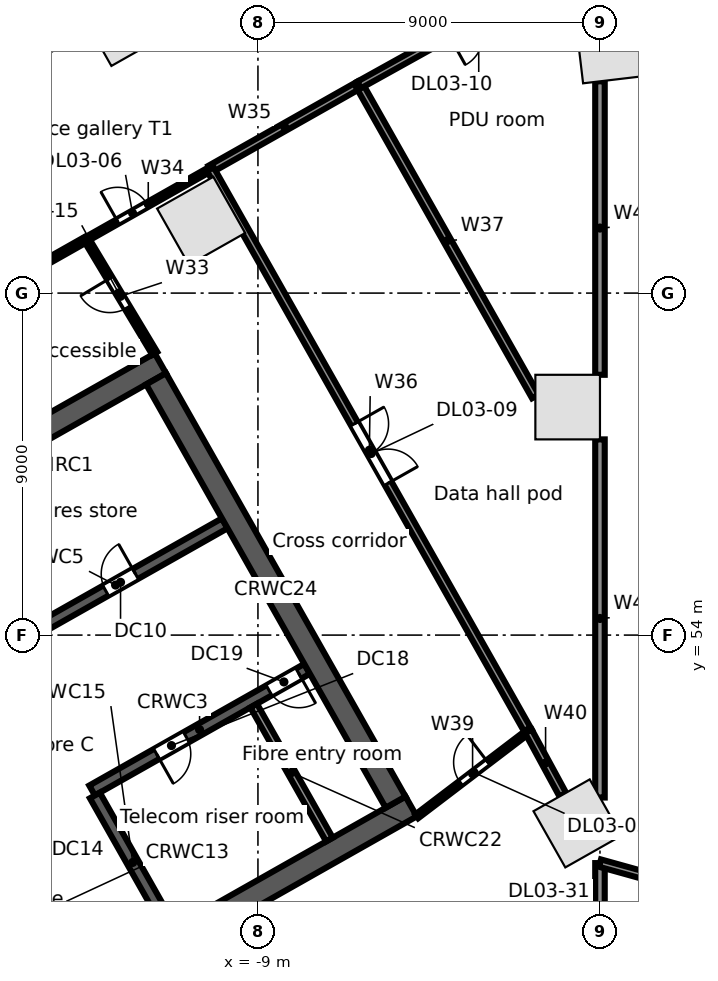
"""IFC4 building model, lengths in metres.
Left out: names, types, materials, properties, quantities, classifications, styles, units other than length and angle.
Written with IfcOpenShell. Run it as: python <this file> out.ifc"""

import sys

from ifc_helpers import new_model, si_unit, direction, frame, frame_2d, origin, origin_2d, place, context, subcontext, project, spatial, rectangle, extrude, element, fill, save


model = new_model("IFC4")
c1 = context("Model", 3, precision=1e-05, world=origin(), true_north=direction((0.0, 1.0)))
c2 = subcontext(c1, "Body", "Model", "MODEL_VIEW")
j1 = project(units=[si_unit("LENGTHUNIT", "METRE"), si_unit("PLANEANGLEUNIT", "RADIAN")], contexts=[c1])
p1 = place(None, origin())
s1 = spatial("IfcSite", under=j1, at=p1, CompositionType="ELEMENT")
p2 = place(p1, origin())
s2 = spatial("IfcBuilding", under=s1, at=p2, CompositionType="ELEMENT")
p3 = place(p2, frame((0.0, 0.0, 16.5)))
s3 = spatial("IfcBuildingStorey", under=s2, at=p3, CompositionType="ELEMENT", Elevation=16.5)
for number, where, z_axis, x_axis in (
    (1, (0.3, 69.464, 0.0), (0.0, 0.0, 1.0), (-0.993, -0.118, 0.0)),
    (2, (-10.495, 64.902, 0.0), (0.0, 0.0, 1.0), (-0.87, -0.492, 0.0)),
    (3, (-0.591, 49.044, 0.0), (0.0, 0.0, 1.0), (0.87, 0.492, 0.0)),
    (4, (-0.85, 60.0, 0.0), (0.0, 0.0, 1.0), (0.0, 1.0, 0.0)),
):
    element("IfcColumn", number, at=place(p3, frame(where, z_axis=z_axis, x_axis=x_axis)), inside=s3, PredefinedType="COLUMN", context=c2, shape_type="SweptSolid", body=[
        extrude(rectangle(XDim=1.7, YDim=1.7, at=origin_2d()), origin(), (0.0, 0.0, 1.0), 5.0),
    ])
p4 = place(p3, frame((-12.667, 69.659, 0.0), z_axis=(0.0, 0.0, 1.0), x_axis=(-0.87035569594, -0.492423560103, 0.0)))
e5 = element("IfcColumn", 5, at=p4, inside=s3, PredefinedType="COLUMN", context=c2, shape_type="SweptSolid", body=[
    extrude(rectangle(XDim=1.0, YDim=1.0, at=origin_2d()), origin(), (0.0, 0.0, 1.0), 5.0),
])
p5 = place(p3, frame((-63.707, 41.701, 0.0), z_axis=(0.0, 0.0, 1.0), x_axis=(0.870355510268, 0.492423888277, 0.0)))
e6 = element("IfcWall", 6, at=p5, inside=s3, PredefinedType="STANDARD", context=c2, shape_type="SweptSolid", body=[
    extrude(rectangle(XDim=67.903, YDim=0.3, at=frame_2d((33.952, 0.0))), origin(), (0.0, 0.0, 1.0), 4.65),
])
p6 = place(p3, frame((-18.024, 42.104, 0.0), z_axis=(0.0, 0.0, 1.0), x_axis=(0.870360574057, 0.492414937962, 0.0)))
e7 = element("IfcWall", 7, at=p6, inside=s3, PredefinedType="SOLIDWALL", context=c2, shape_type="SweptSolid", body=[
    extrude(rectangle(XDim=15.0, YDim=0.6, at=frame_2d((7.5, 0.0))), origin(), (0.0, 0.0, 1.0), 4.65),
])
p7 = place(p6, frame((6.1, 0.0, 0.0)))
e8 = element("IfcOpeningElement", 8, at=p7, cuts=e7, PredefinedType="OPENING", context=c2, shape_type="SweptSolid", body=[
    extrude(rectangle(XDim=1.2, YDim=2.1, at=frame_2d((0.6, 1.05))), frame((0.0, 0.31, 0.0), z_axis=(0.0, -1.0, 0.0), x_axis=(1.0, 0.0, 0.0)), (0.0, 0.0, 1.0), 0.62),
])
p8 = place(p3, frame((-13.365, 49.911, 0.0), z_axis=(0.0, 0.0, 1.0), x_axis=(0.870340995471, 0.49244954219, 0.0)))
e9 = element("IfcWall", 9, at=p8, inside=s3, PredefinedType="SOLIDWALL", context=c2, shape_type="SweptSolid", body=[
    extrude(rectangle(XDim=6.5, YDim=0.3, at=frame_2d((3.25, 0.0))), origin(), (0.0, 0.0, 1.0), 4.65),
])
p9 = place(p8, frame((1.95, 0.0, 0.0)))
e10 = element("IfcOpeningElement", 10, at=p9, cuts=e9, PredefinedType="OPENING", context=c2, shape_type="SweptSolid", body=[
    extrude(rectangle(XDim=0.9, YDim=2.1, at=frame_2d((0.45, 1.05))), frame((0.0, 0.16, 0.0), z_axis=(0.0, -1.0, 0.0), x_axis=(1.0, 0.0, 0.0)), (0.0, 0.0, 1.0), 0.32),
])
p10 = place(p8, frame((5.35, 0.0, 0.0)))
e11 = element("IfcOpeningElement", 11, at=p10, cuts=e9, PredefinedType="OPENING", context=c2, shape_type="SweptSolid", body=[
    extrude(rectangle(XDim=0.9, YDim=2.1, at=frame_2d((0.45, 1.05))), frame((0.0, 0.16, 0.0), z_axis=(0.0, -1.0, 0.0), x_axis=(1.0, 0.0, 0.0)), (0.0, 0.0, 1.0), 0.32),
])
p11 = place(p3, frame((-15.618, 53.691, 0.0), z_axis=(0.0, 0.0, 1.0), x_axis=(0.870356769198, 0.492421663121, 0.0)))
e12 = element("IfcWall", 12, at=p11, inside=s3, PredefinedType="SOLIDWALL", context=c2, shape_type="SweptSolid", body=[
    extrude(rectangle(XDim=6.6, YDim=0.3, at=frame_2d((3.3, 0.0))), origin(), (0.0, 0.0, 1.0), 4.65),
])
p12 = place(p11, frame((3.0, 0.0, 0.0)))
e13 = element("IfcOpeningElement", 13, at=p12, cuts=e12, PredefinedType="OPENING", context=c2, shape_type="SweptSolid", body=[
    extrude(rectangle(XDim=0.9, YDim=2.1, at=frame_2d((0.45, 1.05))), frame((0.0, 0.16, 0.0), z_axis=(0.0, -1.0, 0.0), x_axis=(1.0, 0.0, 0.0)), (0.0, 0.0, 1.0), 0.32),
])
p13 = place(p3, frame((-24.623, 53.767, 0.0), z_axis=(0.0, 0.0, 1.0), x_axis=(0.870356627484, 0.492421913601, 0.0)))
e14 = element("IfcWall", 14, at=p13, inside=s3, PredefinedType="SOLIDWALL", context=c2, shape_type="SweptSolid", body=[
    extrude(rectangle(XDim=15.0, YDim=0.6, at=frame_2d((7.5, 0.0))), origin(), (0.0, 0.0, 1.0), 4.65),
])
for number, where, z_axis, x_axis in (
    (15, (-15.379, 48.599, 0.0), (0.0, 0.0, 1.0), (0.492, -0.87, 0.0)),
    (16, (-13.291, 49.781, 0.0), (0.0, 0.0, 1.0), (0.492, -0.87, 0.0)),
):
    element("IfcWall", number, at=place(p3, frame(where, z_axis=z_axis, x_axis=x_axis)), inside=s3, PredefinedType="SOLIDWALL", context=c2, shape_type="SweptSolid", body=[
        extrude(rectangle(XDim=4.05, YDim=0.3, at=frame_2d((2.025, 0.0))), origin(), (0.0, 0.0, 1.0), 4.65),
    ])
p14 = place(p3, frame((-9.113, 52.144, 0.0), z_axis=(0.0, 0.0, 1.0), x_axis=(0.492394910396, -0.870371904542, 0.0)))
e17 = element("IfcWall", 17, at=p14, inside=s3, PredefinedType="PARTITIONING", context=c2, shape_type="SweptSolid", body=[
    extrude(rectangle(XDim=4.05, YDim=0.2, at=frame_2d((2.025, 0.0))), origin(), (0.0, 0.0, 1.0), 4.65),
])
p15 = place(p3, frame((-11.681, 60.744, 0.0), z_axis=(0.0, 0.0, 1.0), x_axis=(0.492426772896, -0.870353878221, 0.0)))
e18 = element("IfcWall", 18, at=p15, inside=s3, PredefinedType="SOLIDWALL", context=c2, shape_type="SweptSolid", body=[
    extrude(rectangle(XDim=12.8, YDim=0.6, at=frame_2d((6.4, 0.0))), origin(), (0.0, 0.0, 1.0), 4.65),
])
p16 = place(p3, frame((-16.346, 62.816, 0.0), z_axis=(0.0, 0.0, 1.0), x_axis=(0.870334637055, 0.492460779699, 0.0)))
e19 = element("IfcWall", 19, at=p16, inside=s3, PredefinedType="PARTITIONING", context=c2, shape_type="SweptSolid", body=[
    extrude(rectangle(XDim=3.249, YDim=0.15, at=frame_2d((1.625, 0.0))), origin(), (0.0, 0.0, 1.0), 4.65),
])
p17 = place(p3, frame((-13.518, 64.416, 0.0), z_axis=(0.0, 0.0, 1.0), x_axis=(0.514875058642, -0.857265229663, 0.0)))
e20 = element("IfcWall", 20, at=p17, inside=s3, PredefinedType="PARTITIONING", context=c2, shape_type="SweptSolid", body=[
    extrude(rectangle(XDim=3.502, YDim=0.15, at=frame_2d((1.751, 0.0))), origin(), (0.0, 0.0, 1.0), 3.93),
])
p18 = place(p17, frame((1.2, 0.0, 0.0)))
e21 = element("IfcOpeningElement", 21, at=p18, cuts=e20, PredefinedType="OPENING", context=c2, shape_type="SweptSolid", body=[
    extrude(rectangle(XDim=0.9, YDim=2.1, at=frame_2d((0.45, 1.05))), frame((0.0, 0.085, 0.0), z_axis=(0.0, -1.0, 0.0), x_axis=(1.0, 0.0, 0.0)), (0.0, 0.0, 1.0), 0.17),
])
p19 = place(p3, frame((-13.518, 64.416, 0.0), z_axis=(0.0, 0.0, 1.0), x_axis=(0.870338454914, 0.492454032268, 0.0)))
e22 = element("IfcWall", 22, at=p19, inside=s3, PredefinedType="PARTITIONING", context=c2, shape_type="SweptSolid", body=[
    extrude(rectangle(XDim=3.75, YDim=0.125, at=frame_2d((1.875, 0.0))), origin(), (0.0, 0.0, 1.0), 3.712),
])
p20 = place(p19, frame((0.95, 0.0, 0.0)))
e23 = element("IfcOpeningElement", 23, at=p20, cuts=e22, PredefinedType="OPENING", context=c2, shape_type="SweptSolid", body=[
    extrude(rectangle(XDim=0.9, YDim=2.1, at=frame_2d((0.45, 1.05))), frame((0.0, 0.073, 0.0), z_axis=(0.0, -1.0, 0.0), x_axis=(1.0, 0.0, 0.0)), (0.0, 0.0, 1.0), 0.145),
])
p21 = place(p3, frame((-10.254, 66.263, 0.0), z_axis=(0.0, 0.0, 1.0), x_axis=(0.870454697906, 0.492248533664, 0.0)))
e24 = element("IfcWall", 24, at=p21, inside=s3, PredefinedType="PARTITIONING", context=c2, shape_type="SweptSolid", body=[
    extrude(rectangle(XDim=4.5, YDim=0.2, at=frame_2d((2.25, 0.0))), origin(), (0.0, 0.0, 1.0), 4.65),
])
p22 = place(p3, frame((-10.254, 66.263, 0.0), z_axis=(0.0, 0.0, 1.0), x_axis=(0.492411664329, -0.870362426138, 0.0)))
e25 = element("IfcWall", 25, at=p22, inside=s3, PredefinedType="PARTITIONING", context=c2, shape_type="SweptSolid", body=[
    extrude(rectangle(XDim=17.0, YDim=0.2, at=frame_2d((8.5, 0.0))), origin(), (0.0, 0.0, 1.0), 3.712),
])
p23 = place(p22, frame((7.7, 0.0, 0.0)))
e26 = element("IfcOpeningElement", 26, at=p23, cuts=e25, PredefinedType="OPENING", context=c2, shape_type="SweptSolid", body=[
    extrude(rectangle(XDim=1.8, YDim=2.1, at=frame_2d((0.9, 1.05))), frame((0.0, 0.11, 0.0), z_axis=(0.0, -1.0, 0.0), x_axis=(1.0, 0.0, 0.0)), (0.0, 0.0, 1.0), 0.22),
])
p24 = place(p3, frame((-6.337, 68.478, 0.0), z_axis=(0.0, 0.0, 1.0), x_axis=(0.492412602502, -0.870361895361, 0.0)))
e27 = element("IfcWall", 27, at=p24, inside=s3, PredefinedType="PARTITIONING", context=c2, shape_type="SweptSolid", body=[
    extrude(rectangle(XDim=9.417, YDim=0.2, at=frame_2d((4.708, 0.0))), origin(), (0.0, 0.0, 1.0), 3.712),
])
p25 = place(p3, frame((-6.337, 68.478, 0.0), z_axis=(0.0, 0.0, 1.0), x_axis=(0.87407148623, 0.485797320864, 0.0)))
e28 = element("IfcWall", 28, at=p25, inside=s3, PredefinedType="PARTITIONING", context=c2, shape_type="SweptSolid", body=[
    extrude(rectangle(XDim=7.25, YDim=0.2, at=frame_2d((3.625, 0.0))), origin(), (0.0, 0.0, 1.0), 3.93),
])
p26 = place(p25, frame((2.7, 0.0, 0.0)))
e29 = element("IfcOpeningElement", 29, at=p26, cuts=e28, PredefinedType="OPENING", context=c2, shape_type="SweptSolid", body=[
    extrude(rectangle(XDim=1.8, YDim=2.1, at=frame_2d((0.9, 1.05))), frame((0.0, 0.11, 0.0), z_axis=(0.0, -1.0, 0.0), x_axis=(1.0, 0.0, 0.0)), (0.0, 0.0, 1.0), 0.22),
])
p27 = place(p3, frame((-4.821, 49.23, 0.0), z_axis=(0.0, 0.0, 1.0), x_axis=(0.795615322848, 0.605802160816, 0.0)))
e30 = element("IfcWall", 30, at=p27, inside=s3, PredefinedType="PARTITIONING", context=c2, shape_type="SweptSolid", body=[
    extrude(rectangle(XDim=3.693, YDim=0.125, at=frame_2d((1.846, 0.0))), origin(), (0.0, 0.0, 1.0), 4.65),
])
p28 = place(p27, frame((1.45, 0.0, 0.0)))
e31 = element("IfcOpeningElement", 31, at=p28, cuts=e30, PredefinedType="OPENING", context=c2, shape_type="SweptSolid", body=[
    extrude(rectangle(XDim=0.9, YDim=2.1, at=frame_2d((0.45, 1.05))), frame((0.0, 0.073, 0.0), z_axis=(0.0, -1.0, 0.0), x_axis=(1.0, 0.0, 0.0)), (0.0, 0.0, 1.0), 0.145),
])
p29 = place(p3, frame((-1.883, 51.467, 0.0), z_axis=(0.0, 0.0, 1.0), x_axis=(0.477162952876, -0.878814836244, 0.0)))
e32 = element("IfcWall", 32, at=p29, inside=s3, PredefinedType="PARTITIONING", context=c2, shape_type="SweptSolid", body=[
    extrude(rectangle(XDim=1.895, YDim=0.2, at=frame_2d((0.947, 0.0))), origin(), (0.0, 0.0, 1.0), 4.65),
])
p30 = place(p3, frame((0.0, 43.806, 0.0), z_axis=(0.0, 0.0, 1.0), x_axis=(0.0, 1.0, 0.0)))
e33 = element("IfcWall", 33, at=p30, inside=s3, PredefinedType="PARTITIONING", context=c2, shape_type="SweptSolid", body=[
    extrude(rectangle(XDim=4.194, YDim=0.25, at=frame_2d((2.097, 0.0))), origin(), (0.0, 0.0, 1.0), 3.712),
])
p31 = place(p30, frame((1.2, 0.0, 0.0)))
e34 = element("IfcOpeningElement", 34, at=p31, cuts=e33, PredefinedType="OPENING", context=c2, shape_type="SweptSolid", body=[
    extrude(rectangle(XDim=1.8, YDim=2.1, at=frame_2d((0.9, 1.05))), frame((0.0, 0.135, 0.0), z_axis=(0.0, -1.0, 0.0), x_axis=(1.0, 0.0, 0.0)), (0.0, 0.0, 1.0), 0.27),
])
p32 = place(p3, frame((0.0, 48.0, 0.0), z_axis=(0.0, 0.0, 1.0), x_axis=(0.963400508162, -0.268066150181, 0.0)))
e35 = element("IfcWall", 35, at=p32, inside=s3, PredefinedType="PARTITIONING", context=c2, shape_type="SweptSolid", body=[
    extrude(rectangle(XDim=4.443, YDim=0.2, at=frame_2d((2.221, 0.0))), origin(), (0.0, 0.0, 1.0), 4.65),
])
p33 = place(p3, frame((0.0, 49.726, 0.0), z_axis=(0.0, 0.0, 1.0), x_axis=(0.0, 1.0, 0.0)))
e36 = element("IfcWall", 36, at=p33, inside=s3, PredefinedType="PARTITIONING", context=c2, shape_type="SweptSolid", body=[
    extrude(rectangle(XDim=9.424, YDim=0.25, at=frame_2d((4.712, 0.0))), origin(), (0.0, 0.0, 1.0), 4.65),
])
p34 = place(p3, frame((0.0, 60.85, 0.0), z_axis=(0.0, 0.0, 1.0), x_axis=(0.0, 1.0, 0.0)))
e37 = element("IfcWall", 37, at=p34, inside=s3, PredefinedType="PARTITIONING", context=c2, shape_type="SweptSolid", body=[
    extrude(rectangle(XDim=7.723, YDim=0.25, at=frame_2d((3.861, 0.0))), origin(), (0.0, 0.0, 1.0), 3.93),
])
p35 = place(p3, frame((0.0, 72.0, 0.0), z_axis=(0.0, 0.0, 1.0), x_axis=(0.960375968852, -0.278707729443, 0.0)))
e38 = element("IfcWall", 38, at=p35, inside=s3, PredefinedType="PARTITIONING", context=c2, shape_type="SweptSolid", body=[
    extrude(rectangle(XDim=11.058, YDim=0.2, at=frame_2d((5.529, 0.0))), origin(), (0.0, 0.0, 1.0), 3.712),
])
p36 = place(p35, frame((4.7, 0.0, 0.0)))
e39 = element("IfcOpeningElement", 39, at=p36, cuts=e38, PredefinedType="OPENING", context=c2, shape_type="SweptSolid", body=[
    extrude(rectangle(XDim=1.8, YDim=2.1, at=frame_2d((0.9, 1.05))), frame((0.0, 0.11, 0.0), z_axis=(0.0, -1.0, 0.0), x_axis=(1.0, 0.0, 0.0)), (0.0, 0.0, 1.0), 0.22),
])
p37 = place(p12, origin())
e40 = element("IfcDoor", 40, at=p37, inside=s3, OperationType="SINGLE_SWING_RIGHT", PredefinedType="DOOR", context=c2, shape_type="SweptSolid", body=[
    extrude(rectangle(XDim=0.9, YDim=2.1, at=frame_2d((0.45, 1.05))), frame((0.0, 0.025, 0.0), z_axis=(0.0, -1.0, 0.0), x_axis=(1.0, 0.0, 0.0)), (0.0, 0.0, 1.0), 0.05),
])
fill(e13, e40)
p38 = place(p9, frame((0.9, 0.0, 0.0), z_axis=(0.0, 0.0, 1.0), x_axis=(-1.0, 0.0, 0.0)))
e41 = element("IfcDoor", 41, at=p38, inside=s3, OperationType="SINGLE_SWING_RIGHT", PredefinedType="DOOR", context=c2, shape_type="SweptSolid", body=[
    extrude(rectangle(XDim=0.9, YDim=2.1, at=frame_2d((0.45, 1.05))), frame((0.0, 0.025, 0.0), z_axis=(0.0, -1.0, 0.0), x_axis=(1.0, 0.0, 0.0)), (0.0, 0.0, 1.0), 0.05),
])
fill(e10, e41)
p39 = place(p10, frame((0.9, 0.0, 0.0), z_axis=(0.0, 0.0, 1.0), x_axis=(-1.0, 0.0, 0.0)))
e42 = element("IfcDoor", 42, at=p39, inside=s3, OperationType="SINGLE_SWING_LEFT", PredefinedType="DOOR", context=c2, shape_type="SweptSolid", body=[
    extrude(rectangle(XDim=0.9, YDim=2.1, at=frame_2d((0.45, 1.05))), frame((0.0, 0.025, 0.0), z_axis=(0.0, -1.0, 0.0), x_axis=(1.0, 0.0, 0.0)), (0.0, 0.0, 1.0), 0.05),
])
fill(e11, e42)
p40 = place(p28, origin())
e43 = element("IfcDoor", 43, at=p40, inside=s3, OperationType="SINGLE_SWING_RIGHT", PredefinedType="DOOR", context=c2, shape_type="SweptSolid", body=[
    extrude(rectangle(XDim=0.9, YDim=2.1, at=frame_2d((0.45, 1.05))), frame((0.0, 0.025, 0.0), z_axis=(0.0, -1.0, 0.0), x_axis=(1.0, 0.0, 0.0)), (0.0, 0.0, 1.0), 0.05),
])
fill(e31, e43)
p41 = place(p20, origin())
e44 = element("IfcDoor", 44, at=p41, inside=s3, OperationType="SINGLE_SWING_LEFT", PredefinedType="DOOR", context=c2, shape_type="SweptSolid", body=[
    extrude(rectangle(XDim=0.9, YDim=2.1, at=frame_2d((0.45, 1.05))), frame((0.0, 0.025, 0.0), z_axis=(0.0, -1.0, 0.0), x_axis=(1.0, 0.0, 0.0)), (0.0, 0.0, 1.0), 0.05),
])
fill(e23, e44)
p42 = place(p23, origin())
e45 = element("IfcDoor", 45, at=p42, inside=s3, OperationType="DOUBLE_DOOR_SINGLE_SWING", PredefinedType="DOOR", context=c2, shape_type="SweptSolid", body=[
    extrude(rectangle(XDim=1.8, YDim=2.1, at=frame_2d((0.9, 1.05))), frame((0.0, 0.025, 0.0), z_axis=(0.0, -1.0, 0.0), x_axis=(1.0, 0.0, 0.0)), (0.0, 0.0, 1.0), 0.05),
])
fill(e26, e45)
p43 = place(p18, frame((0.9, 0.0, 0.0), z_axis=(0.0, 0.0, 1.0), x_axis=(-1.0, 0.0, 0.0)))
e46 = element("IfcDoor", 46, at=p43, inside=s3, OperationType="SINGLE_SWING_RIGHT", PredefinedType="DOOR", context=c2, shape_type="SweptSolid", body=[
    extrude(rectangle(XDim=0.9, YDim=2.1, at=frame_2d((0.45, 1.05))), frame((0.0, 0.025, 0.0), z_axis=(0.0, -1.0, 0.0), x_axis=(1.0, 0.0, 0.0)), (0.0, 0.0, 1.0), 0.05),
])
fill(e21, e46)
save(model, sys.argv[1])
